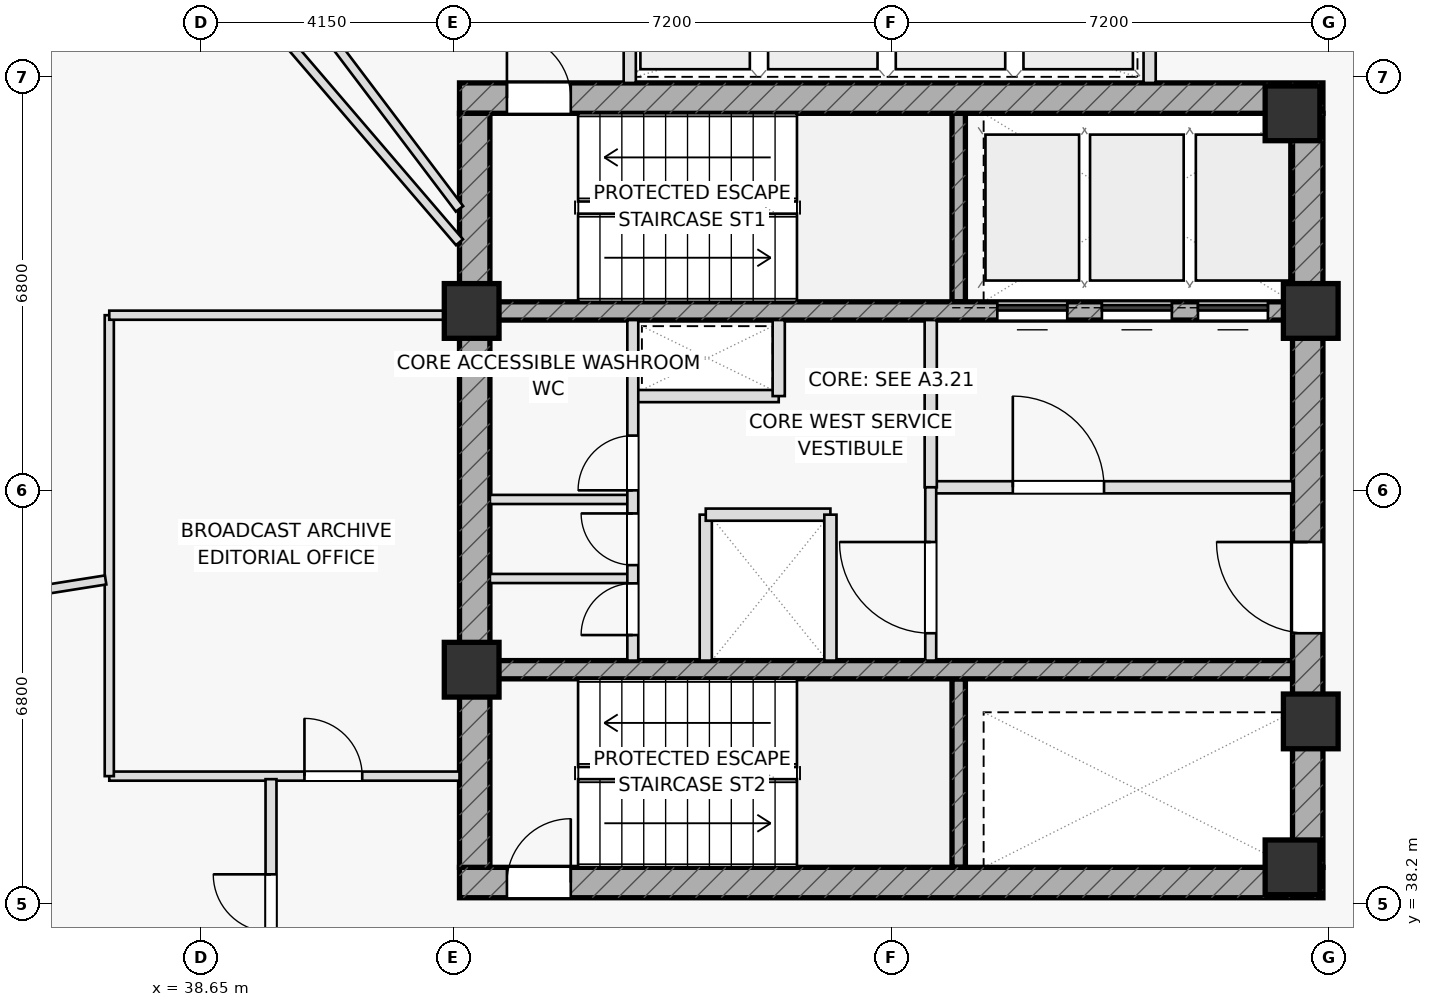
"""IFC4 building model, lengths in metres.
Left out: names, types, materials, properties, quantities, classifications, styles, units other than length and angle.
Written with IfcOpenShell. Run it as: python <this file> out.ifc"""

import sys

from ifc_helpers import new_model, si_unit, direction, frame, frame_2d, origin, origin_2d, place, context, subcontext, project, spatial, rectangle, extrude, element, fill, save


model = new_model("IFC4")
c1 = context("Model", 3, precision=1e-05, world=origin(), true_north=direction((0.0, 1.0)))
c2 = subcontext(c1, "Body", "Model", "MODEL_VIEW")
j1 = project(units=[si_unit("LENGTHUNIT", "METRE"), si_unit("PLANEANGLEUNIT", "RADIAN")], contexts=[c1])
p1 = place(None, origin())
s1 = spatial("IfcSite", under=j1, at=p1, CompositionType="ELEMENT")
p2 = place(p1, origin())
s2 = spatial("IfcBuilding", under=s1, at=p2, CompositionType="ELEMENT")
p3 = place(p2, frame((0.0, 0.0, 222.15)))
s3 = spatial("IfcBuildingStorey", under=s2, at=p3, CompositionType="ELEMENT", Elevation=222.15)
for number, where, z_axis, x_axis in (
    (1, (51.11, 48.1, 0.0), (0.0, 0.0, 1.0), (0.0, 1.0, 0.0)),
    (2, (51.11, 38.8, 0.0), (0.0, 0.0, 1.0), (0.0, 1.0, 0.0)),
):
    element("IfcWall", number, at=place(p3, frame(where, z_axis=z_axis, x_axis=x_axis)), inside=s3, PredefinedType="SHEAR", context=c2, shape_type="SweptSolid", body=[
        extrude(rectangle(XDim=3.1, YDim=0.22, at=frame_2d((1.55, 0.0))), origin(), (0.0, 0.0, 1.0), 3.65),
    ])
p4 = place(p3, frame((42.9, 51.45, 0.0), z_axis=(0.0, 0.0, 1.0), x_axis=(1.0, 0.0, 0.0)))
e3 = element("IfcWall", 3, at=p4, inside=s3, PredefinedType="SHEAR", context=c2, shape_type="SweptSolid", body=[
    extrude(rectangle(XDim=14.2, YDim=0.5, at=frame_2d((7.1, 0.0))), origin(), (0.0, 0.0, 1.0), 3.65),
])
p5 = place(p4, frame((0.78, 0.0, 0.0)))
e4 = element("IfcOpeningElement", 4, at=p5, cuts=e3, PredefinedType="OPENING", context=c2, shape_type="SweptSolid", body=[
    extrude(rectangle(XDim=1.05, YDim=2.2, at=frame_2d((0.525, 1.1))), frame((0.0, 0.26, 0.0), z_axis=(0.0, -1.0, 0.0), x_axis=(1.0, 0.0, 0.0)), (0.0, 0.0, 1.0), 0.52),
])
p6 = place(p3, frame((42.9, 38.55, 0.0), z_axis=(0.0, 0.0, 1.0), x_axis=(1.0, 0.0, 0.0)))
e5 = element("IfcWall", 5, at=p6, inside=s3, PredefinedType="SHEAR", context=c2, shape_type="SweptSolid", body=[
    extrude(rectangle(XDim=14.2, YDim=0.5, at=frame_2d((7.1, 0.0))), origin(), (0.0, 0.0, 1.0), 3.65),
])
p7 = place(p6, frame((0.78, 0.0, 0.0)))
e6 = element("IfcOpeningElement", 6, at=p7, cuts=e5, PredefinedType="OPENING", context=c2, shape_type="SweptSolid", body=[
    extrude(rectangle(XDim=1.05, YDim=2.2, at=frame_2d((0.525, 1.1))), frame((0.0, 0.26, 0.0), z_axis=(0.0, -1.0, 0.0), x_axis=(1.0, 0.0, 0.0)), (0.0, 0.0, 1.0), 0.52),
])
p8 = place(p3, frame((43.15, 38.8, 0.0), z_axis=(0.0, 0.0, 1.0), x_axis=(0.0, 1.0, 0.0)))
e7 = element("IfcWall", 7, at=p8, inside=s3, PredefinedType="SHEAR", context=c2, shape_type="SweptSolid", body=[
    extrude(rectangle(XDim=12.4, YDim=0.5, at=frame_2d((6.2, 0.0))), origin(), (0.0, 0.0, 1.0), 3.65),
])
p9 = place(p3, frame((56.85, 38.8, 0.0), z_axis=(0.0, 0.0, 1.0), x_axis=(0.0, 1.0, 0.0)))
e8 = element("IfcWall", 8, at=p9, inside=s3, PredefinedType="SHEAR", context=c2, shape_type="SweptSolid", body=[
    extrude(rectangle(XDim=12.4, YDim=0.5, at=frame_2d((6.2, 0.0))), origin(), (0.0, 0.0, 1.0), 3.65),
])
p10 = place(p9, frame((3.85, 0.0, 0.0)))
e9 = element("IfcOpeningElement", 9, at=p10, cuts=e8, PredefinedType="OPENING", context=c2, shape_type="SweptSolid", body=[
    extrude(rectangle(XDim=1.5, YDim=2.2, at=frame_2d((0.75, 1.1))), frame((0.0, 0.26, 0.0), z_axis=(0.0, -1.0, 0.0), x_axis=(1.0, 0.0, 0.0)), (0.0, 0.0, 1.0), 0.52),
])
p11 = place(p3, frame((43.4, 47.95, 0.0), z_axis=(0.0, 0.0, 1.0), x_axis=(1.0, 0.0, 0.0)))
e10 = element("IfcWall", 10, at=p11, inside=s3, PredefinedType="SHEAR", context=c2, shape_type="SweptSolid", body=[
    extrude(rectangle(XDim=13.2, YDim=0.3, at=frame_2d((6.6, 0.0))), origin(), (0.0, 0.0, 1.0), 3.65),
])
p12 = place(p11, frame((8.345, 0.0, 0.0)))
e11 = element("IfcOpeningElement", 11, at=p12, cuts=e10, PredefinedType="OPENING", context=c2, shape_type="SweptSolid", body=[
    extrude(rectangle(XDim=1.15, YDim=2.2, at=frame_2d((0.575, 1.1))), frame((0.0, 0.16, 0.0), z_axis=(0.0, -1.0, 0.0), x_axis=(1.0, 0.0, 0.0)), (0.0, 0.0, 1.0), 0.32),
])
p13 = place(p11, frame((10.065, 0.0, 0.0)))
e12 = element("IfcOpeningElement", 12, at=p13, cuts=e10, PredefinedType="OPENING", context=c2, shape_type="SweptSolid", body=[
    extrude(rectangle(XDim=1.15, YDim=2.2, at=frame_2d((0.575, 1.1))), frame((0.0, 0.16, 0.0), z_axis=(0.0, -1.0, 0.0), x_axis=(1.0, 0.0, 0.0)), (0.0, 0.0, 1.0), 0.32),
])
p14 = place(p11, frame((11.645, 0.0, 0.0)))
e13 = element("IfcOpeningElement", 13, at=p14, cuts=e10, PredefinedType="OPENING", context=c2, shape_type="SweptSolid", body=[
    extrude(rectangle(XDim=1.15, YDim=2.2, at=frame_2d((0.575, 1.1))), frame((0.0, 0.16, 0.0), z_axis=(0.0, -1.0, 0.0), x_axis=(1.0, 0.0, 0.0)), (0.0, 0.0, 1.0), 0.32),
])
p15 = place(p3, frame((43.4, 42.05, 0.0), z_axis=(0.0, 0.0, 1.0), x_axis=(1.0, 0.0, 0.0)))
e14 = element("IfcWall", 14, at=p15, inside=s3, PredefinedType="SHEAR", context=c2, shape_type="SweptSolid", body=[
    extrude(rectangle(XDim=13.2, YDim=0.3, at=frame_2d((6.6, 0.0))), origin(), (0.0, 0.0, 1.0), 3.65),
])
for number, where, z_axis, x_axis in (
    (15, (43.1, 47.95, 0.0), (0.0, 0.0, 1.0), (1.0, 0.0, 0.0)),
    (16, (56.9, 47.95, 0.0), (0.0, 0.0, 1.0), (1.0, 0.0, 0.0)),
    (17, (56.6, 51.2, 0.0), (0.0, 0.0, 1.0), (1.0, 0.0, 0.0)),
    (18, (43.1, 42.05, 0.0), (0.0, 0.0, 1.0), (1.0, 0.0, 0.0)),
    (19, (56.9, 41.2, 0.0), (0.0, 0.0, 1.0), (1.0, 0.0, 0.0)),
    (20, (56.6, 38.8, 0.0), (0.0, 0.0, 1.0), (1.0, 0.0, 0.0)),
):
    element("IfcColumn", number, at=place(p3, frame(where, z_axis=z_axis, x_axis=x_axis)), inside=s3, PredefinedType="COLUMN", context=c2, shape_type="SweptSolid", body=[
        extrude(rectangle(XDim=0.9, YDim=0.9, at=origin_2d()), origin(), (0.0, 0.0, 1.0), 3.65),
    ])
for number, where, z_axis, x_axis in (
    (21, (45.7, 51.7, 0.0), (0.0, 0.0, 1.0), (0.0, 1.0, 0.0)),
    (22, (54.25, 51.7, 0.0), (0.0, 0.0, 1.0), (0.0, 1.0, 0.0)),
):
    element("IfcWall", number, at=place(p3, frame(where, z_axis=z_axis, x_axis=x_axis)), inside=s3, PredefinedType="PARTITIONING", context=c2, shape_type="SweptSolid", body=[
        extrude(rectangle(XDim=2.6, YDim=0.2, at=frame_2d((1.3, 0.0))), origin(), (0.0, 0.0, 1.0), 3.65),
    ])
p16 = place(p3, frame((45.75, 46.55, 0.0), z_axis=(0.0, 0.0, 1.0), x_axis=(1.0, 0.0, 0.0)))
e23 = element("IfcWall", 23, at=p16, inside=s3, PredefinedType="PARTITIONING", context=c2, shape_type="SweptSolid", body=[
    extrude(rectangle(XDim=2.4, YDim=0.2, at=frame_2d((1.2, 0.0))), origin(), (0.0, 0.0, 1.0), 3.65),
])
p17 = place(p3, frame((48.15, 46.55, 0.0), z_axis=(0.0, 0.0, 1.0), x_axis=(0.0, 1.0, 0.0)))
e24 = element("IfcWall", 24, at=p17, inside=s3, PredefinedType="PARTITIONING", context=c2, shape_type="SweptSolid", body=[
    extrude(rectangle(XDim=1.25, YDim=0.2, at=frame_2d((0.625, 0.0))), origin(), (0.0, 0.0, 1.0), 3.65),
])
p18 = place(p3, frame((46.95, 42.2, 0.0), z_axis=(0.0, 0.0, 1.0), x_axis=(0.0, 1.0, 0.0)))
e25 = element("IfcWall", 25, at=p18, inside=s3, PredefinedType="PARTITIONING", context=c2, shape_type="SweptSolid", body=[
    extrude(rectangle(XDim=2.4, YDim=0.2, at=frame_2d((1.2, 0.0))), origin(), (0.0, 0.0, 1.0), 3.65),
])
p19 = place(p3, frame((46.95, 44.6, 0.0), z_axis=(0.0, 0.0, 1.0), x_axis=(1.0, 0.0, 0.0)))
e26 = element("IfcWall", 26, at=p19, inside=s3, PredefinedType="PARTITIONING", context=c2, shape_type="SweptSolid", body=[
    extrude(rectangle(XDim=2.05, YDim=0.2, at=frame_2d((1.025, 0.0))), origin(), (0.0, 0.0, 1.0), 3.65),
])
p20 = place(p3, frame((50.65, 45.05, 0.0), z_axis=(0.0, 0.0, 1.0), x_axis=(1.0, 0.0, 0.0)))
e27 = element("IfcWall", 27, at=p20, inside=s3, PredefinedType="PARTITIONING", context=c2, shape_type="SweptSolid", body=[
    extrude(rectangle(XDim=5.95, YDim=0.2, at=frame_2d((2.975, 0.0))), origin(), (0.0, 0.0, 1.0), 3.65),
])
p21 = place(p20, frame((1.35, 0.0, 0.0)))
e28 = element("IfcOpeningElement", 28, at=p21, cuts=e27, PredefinedType="OPENING", context=c2, shape_type="SweptSolid", body=[
    extrude(rectangle(XDim=1.5, YDim=2.2, at=frame_2d((0.75, 1.1))), frame((0.0, 0.11, 0.0), z_axis=(0.0, -1.0, 0.0), x_axis=(1.0, 0.0, 0.0)), (0.0, 0.0, 1.0), 0.22),
])
p22 = place(p3, frame((50.65, 45.05, 0.0), z_axis=(0.0, 0.0, 1.0), x_axis=(0.0, 1.0, 0.0)))
e29 = element("IfcWall", 29, at=p22, inside=s3, PredefinedType="PARTITIONING", context=c2, shape_type="SweptSolid", body=[
    extrude(rectangle(XDim=2.75, YDim=0.2, at=frame_2d((1.375, 0.0))), origin(), (0.0, 0.0, 1.0), 3.65),
])
p23 = place(p3, frame((50.65, 42.2, 0.0), z_axis=(0.0, 0.0, 1.0), x_axis=(0.0, 1.0, 0.0)))
e30 = element("IfcWall", 30, at=p23, inside=s3, PredefinedType="PARTITIONING", context=c2, shape_type="SweptSolid", body=[
    extrude(rectangle(XDim=2.85, YDim=0.18, at=frame_2d((1.425, 0.0))), origin(), (0.0, 0.0, 1.0), 3.65),
])
p24 = place(p23, frame((0.45, 0.0, 0.0)))
e31 = element("IfcOpeningElement", 31, at=p24, cuts=e30, PredefinedType="OPENING", context=c2, shape_type="SweptSolid", body=[
    extrude(rectangle(XDim=1.5, YDim=2.2, at=frame_2d((0.75, 1.1))), frame((0.0, 0.1, 0.0), z_axis=(0.0, -1.0, 0.0), x_axis=(1.0, 0.0, 0.0)), (0.0, 0.0, 1.0), 0.2),
])
for number, where, z_axis, x_axis in (
    (32, (43.4, 43.55, 0.0), (0.0, 0.0, 1.0), (1.0, 0.0, 0.0)),
    (33, (43.4, 44.85, 0.0), (0.0, 0.0, 1.0), (1.0, 0.0, 0.0)),
):
    element("IfcWall", number, at=place(p3, frame(where, z_axis=z_axis, x_axis=x_axis)), inside=s3, PredefinedType="PARTITIONING", context=c2, shape_type="SweptSolid", body=[
        extrude(rectangle(XDim=2.35, YDim=0.15, at=frame_2d((1.175, 0.0))), origin(), (0.0, 0.0, 1.0), 3.65),
    ])
p25 = place(p3, frame((45.75, 42.2, 0.0), z_axis=(0.0, 0.0, 1.0), x_axis=(0.0, 1.0, 0.0)))
e34 = element("IfcWall", 34, at=p25, inside=s3, PredefinedType="PARTITIONING", context=c2, shape_type="SweptSolid", body=[
    extrude(rectangle(XDim=5.6, YDim=0.18, at=frame_2d((2.8, 0.0))), origin(), (0.0, 0.0, 1.0), 3.65),
])
p26 = place(p25, frame((0.42, 0.0, 0.0)))
e35 = element("IfcOpeningElement", 35, at=p26, cuts=e34, PredefinedType="OPENING", context=c2, shape_type="SweptSolid", body=[
    extrude(rectangle(XDim=0.85, YDim=2.05, at=frame_2d((0.425, 1.025))), frame((0.0, 0.1, 0.0), z_axis=(0.0, -1.0, 0.0), x_axis=(1.0, 0.0, 0.0)), (0.0, 0.0, 1.0), 0.2),
])
p27 = place(p25, frame((1.57, 0.0, 0.0)))
e36 = element("IfcOpeningElement", 36, at=p27, cuts=e34, PredefinedType="OPENING", context=c2, shape_type="SweptSolid", body=[
    extrude(rectangle(XDim=0.85, YDim=2.05, at=frame_2d((0.425, 1.025))), frame((0.0, 0.1, 0.0), z_axis=(0.0, -1.0, 0.0), x_axis=(1.0, 0.0, 0.0)), (0.0, 0.0, 1.0), 0.2),
])
p28 = place(p25, frame((2.8, 0.0, 0.0)))
e37 = element("IfcOpeningElement", 37, at=p28, cuts=e34, PredefinedType="OPENING", context=c2, shape_type="SweptSolid", body=[
    extrude(rectangle(XDim=0.9, YDim=2.05, at=frame_2d((0.45, 1.025))), frame((0.0, 0.1, 0.0), z_axis=(0.0, -1.0, 0.0), x_axis=(1.0, 0.0, 0.0)), (0.0, 0.0, 1.0), 0.2),
])
p29 = place(p3, frame((37.14, 40.3, 0.0), z_axis=(0.0, 0.0, 1.0), x_axis=(1.0, 0.0, 0.0)))
e38 = element("IfcWall", 38, at=p29, inside=s3, PredefinedType="PARTITIONING", context=c2, shape_type="SweptSolid", body=[
    extrude(rectangle(XDim=5.76, YDim=0.15, at=frame_2d((2.88, 0.0))), origin(), (0.0, 0.0, 1.0), 3.025),
])
p30 = place(p29, frame((3.21, 0.0, 0.0)))
e39 = element("IfcOpeningElement", 39, at=p30, cuts=e38, PredefinedType="OPENING", context=c2, shape_type="SweptSolid", body=[
    extrude(rectangle(XDim=0.95, YDim=2.05, at=frame_2d((0.475, 1.025))), frame((0.0, 0.085, 0.0), z_axis=(0.0, -1.0, 0.0), x_axis=(1.0, 0.0, 0.0)), (0.0, 0.0, 1.0), 0.17),
])
p31 = place(p3, frame((37.14, 40.3, 0.0), z_axis=(0.0, 0.0, 1.0), x_axis=(0.0, 1.0, 0.0)))
e40 = element("IfcWall", 40, at=p31, inside=s3, PredefinedType="PARTITIONING", context=c2, shape_type="SweptSolid", body=[
    extrude(rectangle(XDim=7.58, YDim=0.15, at=frame_2d((3.79, 0.0))), origin(), (0.0, 0.0, 1.0), 3.65),
])
p32 = place(p3, frame((37.14, 47.88, 0.0), z_axis=(0.0, 0.0, 1.0), x_axis=(1.0, 0.0, 0.0)))
e41 = element("IfcWall", 41, at=p32, inside=s3, PredefinedType="PARTITIONING", context=c2, shape_type="SweptSolid", body=[
    extrude(rectangle(XDim=5.76, YDim=0.15, at=frame_2d((2.88, 0.0))), origin(), (0.0, 0.0, 1.0), 3.025),
])
p33 = place(p3, frame((42.9, 49.629, 0.0), z_axis=(0.0, 0.0, 1.0), x_axis=(-0.603127375297, 0.797644889138, 0.0)))
e42 = element("IfcWall", 42, at=p33, inside=s3, PredefinedType="PARTITIONING", context=c2, shape_type="SweptSolid", body=[
    extrude(rectangle(XDim=20.629, YDim=0.15, at=frame_2d((10.314, 0.0))), origin(), (0.0, 0.0, 1.0), 3.025),
])
p34 = place(p3, frame((42.9, 49.08, 0.0), z_axis=(0.0, 0.0, 1.0), x_axis=(-0.651097245438, 0.758994319467, 0.0)))
e43 = element("IfcWall", 43, at=p34, inside=s3, PredefinedType="PARTITIONING", context=c2, shape_type="SweptSolid", body=[
    extrude(rectangle(XDim=21.819, YDim=0.15, at=frame_2d((10.91, 0.0))), origin(), (0.0, 0.0, 1.0), 3.025),
])
p35 = place(p34, frame((9.819, 0.0, 0.0)))
e44 = element("IfcOpeningElement", 44, at=p35, cuts=e43, PredefinedType="OPENING", context=c2, shape_type="SweptSolid", body=[
    extrude(rectangle(XDim=0.95, YDim=2.05, at=frame_2d((0.475, 1.025))), frame((0.0, 0.085, 0.0), z_axis=(0.0, -1.0, 0.0), x_axis=(1.0, 0.0, 0.0)), (0.0, 0.0, 1.0), 0.17),
])
p36 = place(p3, frame((37.08, 43.526, 0.0), z_axis=(0.0, 0.0, 1.0), x_axis=(-0.987725532743, -0.156199462122, 0.0)))
e45 = element("IfcWall", 45, at=p36, inside=s3, PredefinedType="PARTITIONING", context=c2, shape_type="SweptSolid", body=[
    extrude(rectangle(XDim=10.161, YDim=0.15, at=frame_2d((5.081, 0.0))), origin(), (0.0, 0.0, 1.0), 3.135),
])
p37 = place(p36, frame((1.35, 0.0, 0.0)))
e46 = element("IfcOpeningElement", 46, at=p37, cuts=e45, PredefinedType="OPENING", context=c2, shape_type="SweptSolid", body=[
    extrude(rectangle(XDim=0.95, YDim=2.05, at=frame_2d((0.475, 1.025))), frame((0.0, 0.085, 0.0), z_axis=(0.0, -1.0, 0.0), x_axis=(1.0, 0.0, 0.0)), (0.0, 0.0, 1.0), 0.17),
])
p38 = place(p3, frame((39.8, 36.17, 0.0), z_axis=(0.0, 0.0, 1.0), x_axis=(0.0, 1.0, 0.0)))
e47 = element("IfcWall", 47, at=p38, inside=s3, PredefinedType="PARTITIONING", context=c2, shape_type="SweptSolid", body=[
    extrude(rectangle(XDim=4.08, YDim=0.18, at=frame_2d((2.04, 0.0))), origin(), (0.0, 0.0, 1.0), 3.325),
])
p39 = place(p38, frame((1.565, 0.0, 0.0)))
e48 = element("IfcOpeningElement", 48, at=p39, cuts=e47, PredefinedType="OPENING", context=c2, shape_type="SweptSolid", body=[
    extrude(rectangle(XDim=0.95, YDim=2.05, at=frame_2d((0.475, 1.025))), frame((0.0, 0.1, 0.0), z_axis=(0.0, -1.0, 0.0), x_axis=(1.0, 0.0, 0.0)), (0.0, 0.0, 1.0), 0.2),
])
p40 = place(p3, frame((49.0, 42.2, 0.0), z_axis=(0.0, 0.0, 1.0), x_axis=(0.0, 1.0, 0.0)))
e49 = element("IfcWall", 49, at=p40, inside=s3, PredefinedType="PARTITIONING", context=c2, shape_type="SweptSolid", body=[
    extrude(rectangle(XDim=2.4, YDim=0.2, at=frame_2d((1.2, 0.0))), origin(), (0.0, 0.0, 1.0), 3.65),
])
p41 = place(p5, origin())
e50 = element("IfcDoor", 50, at=p41, inside=s3, OperationType="SINGLE_SWING_LEFT", PredefinedType="DOOR", context=c2, shape_type="SweptSolid", body=[
    extrude(rectangle(XDim=1.05, YDim=2.2, at=frame_2d((0.525, 1.1))), frame((0.0, 0.025, 0.0), z_axis=(0.0, -1.0, 0.0), x_axis=(1.0, 0.0, 0.0)), (0.0, 0.0, 1.0), 0.05),
])
fill(e4, e50)
p42 = place(p7, origin())
e51 = element("IfcDoor", 51, at=p42, inside=s3, OperationType="SINGLE_SWING_RIGHT", PredefinedType="DOOR", context=c2, shape_type="SweptSolid", body=[
    extrude(rectangle(XDim=1.05, YDim=2.2, at=frame_2d((0.525, 1.1))), frame((0.0, 0.025, 0.0), z_axis=(0.0, -1.0, 0.0), x_axis=(1.0, 0.0, 0.0)), (0.0, 0.0, 1.0), 0.05),
])
fill(e6, e51)
p43 = place(p10, origin())
e52 = element("IfcDoor", 52, at=p43, inside=s3, OperationType="SINGLE_SWING_RIGHT", PredefinedType="DOOR", context=c2, shape_type="SweptSolid", body=[
    extrude(rectangle(XDim=1.5, YDim=2.2, at=frame_2d((0.75, 1.1))), frame((0.0, 0.025, 0.0), z_axis=(0.0, -1.0, 0.0), x_axis=(1.0, 0.0, 0.0)), (0.0, 0.0, 1.0), 0.05),
])
fill(e9, e52)
p44 = place(p21, origin())
e53 = element("IfcDoor", 53, at=p44, inside=s3, OperationType="SINGLE_SWING_LEFT", PredefinedType="DOOR", context=c2, shape_type="SweptSolid", body=[
    extrude(rectangle(XDim=1.5, YDim=2.2, at=frame_2d((0.75, 1.1))), frame((0.0, 0.025, 0.0), z_axis=(0.0, -1.0, 0.0), x_axis=(1.0, 0.0, 0.0)), (0.0, 0.0, 1.0), 0.05),
])
fill(e28, e53)
p45 = place(p24, origin())
e54 = element("IfcDoor", 54, at=p45, inside=s3, OperationType="SINGLE_SWING_RIGHT", PredefinedType="DOOR", context=c2, shape_type="SweptSolid", body=[
    extrude(rectangle(XDim=1.5, YDim=2.2, at=frame_2d((0.75, 1.1))), frame((0.0, 0.025, 0.0), z_axis=(0.0, -1.0, 0.0), x_axis=(1.0, 0.0, 0.0)), (0.0, 0.0, 1.0), 0.05),
])
fill(e31, e54)
p46 = place(p26, origin())
e55 = element("IfcDoor", 55, at=p46, inside=s3, OperationType="SINGLE_SWING_LEFT", PredefinedType="DOOR", context=c2, shape_type="SweptSolid", body=[
    extrude(rectangle(XDim=0.85, YDim=2.05, at=frame_2d((0.425, 1.025))), frame((0.0, 0.025, 0.0), z_axis=(0.0, -1.0, 0.0), x_axis=(1.0, 0.0, 0.0)), (0.0, 0.0, 1.0), 0.05),
])
fill(e35, e55)
p47 = place(p27, origin())
e56 = element("IfcDoor", 56, at=p47, inside=s3, OperationType="SINGLE_SWING_RIGHT", PredefinedType="DOOR", context=c2, shape_type="SweptSolid", body=[
    extrude(rectangle(XDim=0.85, YDim=2.05, at=frame_2d((0.425, 1.025))), frame((0.0, 0.025, 0.0), z_axis=(0.0, -1.0, 0.0), x_axis=(1.0, 0.0, 0.0)), (0.0, 0.0, 1.0), 0.05),
])
fill(e36, e56)
p48 = place(p28, origin())
e57 = element("IfcDoor", 57, at=p48, inside=s3, OperationType="SINGLE_SWING_LEFT", PredefinedType="DOOR", context=c2, shape_type="SweptSolid", body=[
    extrude(rectangle(XDim=0.9, YDim=2.05, at=frame_2d((0.45, 1.025))), frame((0.0, 0.025, 0.0), z_axis=(0.0, -1.0, 0.0), x_axis=(1.0, 0.0, 0.0)), (0.0, 0.0, 1.0), 0.05),
])
fill(e37, e57)
p49 = place(p30, origin())
e58 = element("IfcDoor", 58, at=p49, inside=s3, OperationType="SINGLE_SWING_LEFT", PredefinedType="DOOR", context=c2, shape_type="SweptSolid", body=[
    extrude(rectangle(XDim=0.95, YDim=2.05, at=frame_2d((0.475, 1.025))), frame((0.0, 0.025, 0.0), z_axis=(0.0, -1.0, 0.0), x_axis=(1.0, 0.0, 0.0)), (0.0, 0.0, 1.0), 0.05),
])
fill(e39, e58)
p50 = place(p39, origin())
e59 = element("IfcDoor", 59, at=p50, inside=s3, OperationType="SINGLE_SWING_RIGHT", PredefinedType="DOOR", context=c2, shape_type="SweptSolid", body=[
    extrude(rectangle(XDim=0.95, YDim=2.05, at=frame_2d((0.475, 1.025))), frame((0.0, 0.025, 0.0), z_axis=(0.0, -1.0, 0.0), x_axis=(1.0, 0.0, 0.0)), (0.0, 0.0, 1.0), 0.05),
])
fill(e48, e59)
p51 = place(p12, origin())
e60 = element("IfcDoor", 60, at=p51, inside=s3, OperationType="SLIDING_TO_LEFT", PredefinedType="DOOR", context=c2, shape_type="SweptSolid", body=[
    extrude(rectangle(XDim=1.15, YDim=2.2, at=frame_2d((0.575, 1.1))), frame((0.0, 0.025, 0.0), z_axis=(0.0, -1.0, 0.0), x_axis=(1.0, 0.0, 0.0)), (0.0, 0.0, 1.0), 0.05),
])
fill(e11, e60)
p52 = place(p13, origin())
e61 = element("IfcDoor", 61, at=p52, inside=s3, OperationType="SLIDING_TO_LEFT", PredefinedType="DOOR", context=c2, shape_type="SweptSolid", body=[
    extrude(rectangle(XDim=1.15, YDim=2.2, at=frame_2d((0.575, 1.1))), frame((0.0, 0.025, 0.0), z_axis=(0.0, -1.0, 0.0), x_axis=(1.0, 0.0, 0.0)), (0.0, 0.0, 1.0), 0.05),
])
fill(e12, e61)
p53 = place(p14, origin())
e62 = element("IfcDoor", 62, at=p53, inside=s3, OperationType="SLIDING_TO_LEFT", PredefinedType="DOOR", context=c2, shape_type="SweptSolid", body=[
    extrude(rectangle(XDim=1.15, YDim=2.2, at=frame_2d((0.575, 1.1))), frame((0.0, 0.025, 0.0), z_axis=(0.0, -1.0, 0.0), x_axis=(1.0, 0.0, 0.0)), (0.0, 0.0, 1.0), 0.05),
])
fill(e13, e62)
save(model, sys.argv[1])
